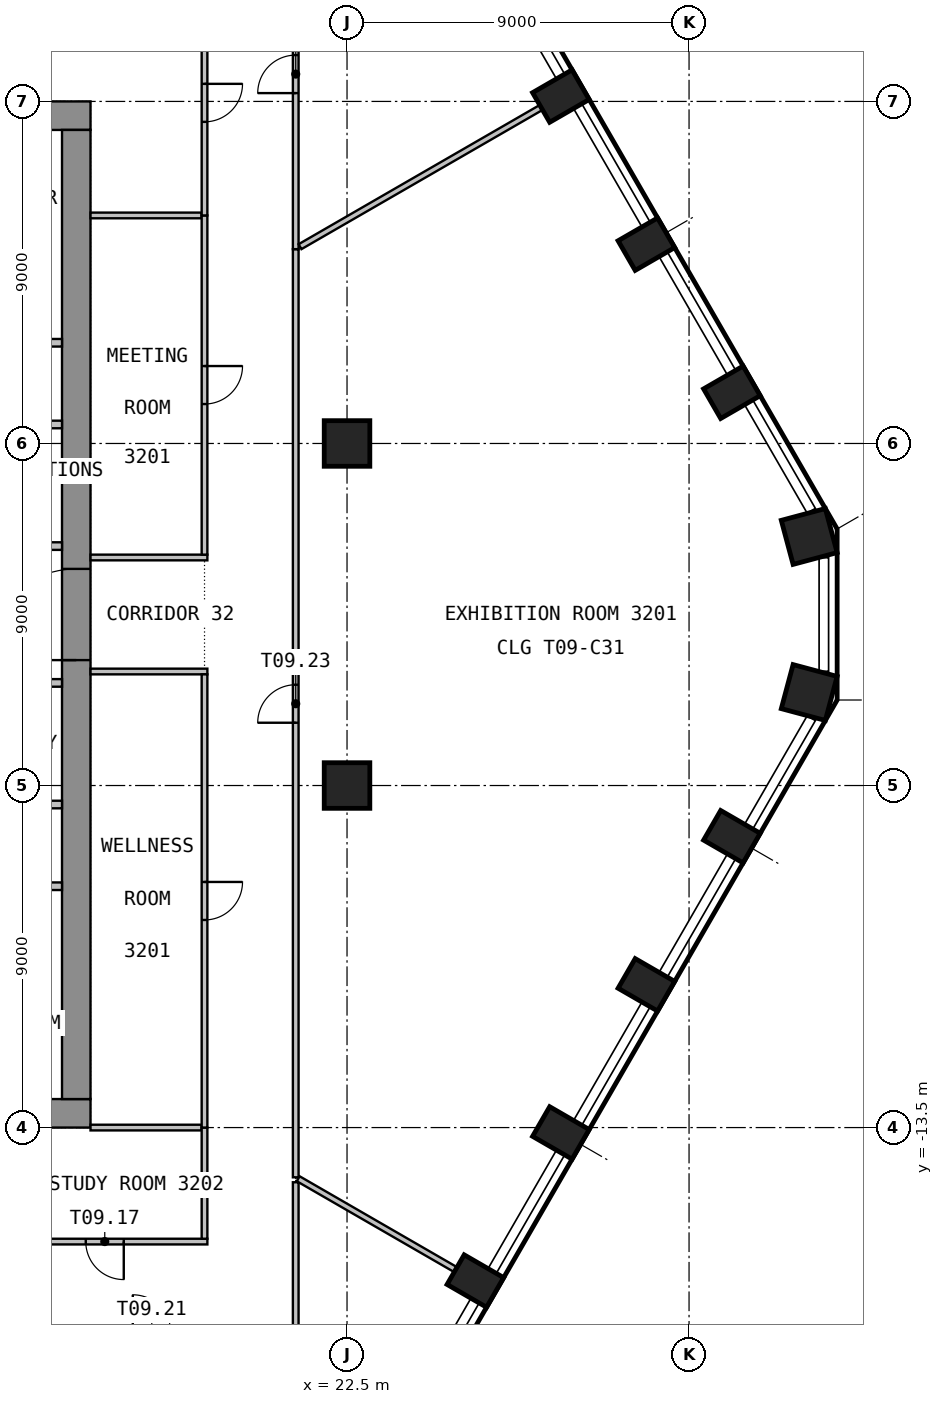
"""IFC4 building model, lengths in metres.
Left out: names, types, materials, properties, quantities, classifications, styles, units other than length and angle.
Written with IfcOpenShell. Run it as: python <this file> out.ifc"""

import sys

from ifc_helpers import new_model, si_unit, direction, frame, frame_2d, origin, origin_2d, place, context, subcontext, project, spatial, rectangle, circle, extrude, element, fill, save


model = new_model("IFC4")
c1 = context("Model", 3, precision=1e-05, world=origin(), true_north=direction((0.0, 1.0)))
c2 = subcontext(c1, "Body", "Model", "MODEL_VIEW")
j1 = project(units=[si_unit("LENGTHUNIT", "METRE"), si_unit("PLANEANGLEUNIT", "RADIAN")], contexts=[c1])
p1 = place(None, origin())
s1 = spatial("IfcSite", under=j1, at=p1, CompositionType="ELEMENT")
p2 = place(p1, origin())
s2 = spatial("IfcBuilding", under=s1, at=p2, CompositionType="ELEMENT")
p3 = place(p2, frame((0.0, 0.0, 132.6)))
s3 = spatial("IfcBuildingStorey", under=s2, at=p3, CompositionType="ELEMENT", Elevation=132.6)
for number, where, z_axis, x_axis in (
    (1, (25.877, -17.539, 0.0), (0.0, 0.0, 1.0), (0.5, 0.866, 0.0)),
    (2, (28.127, -13.641, 0.0), (0.0, 0.0, 1.0), (0.5, 0.866, 0.0)),
    (3, (30.377, -9.744, 0.0), (0.0, 0.0, 1.0), (0.5, 0.866, 0.0)),
    (4, (32.627, -5.847, 0.0), (0.0, 0.0, 1.0), (0.5, 0.866, 0.0)),
):
    element("IfcColumn", number, at=place(p3, frame(where, z_axis=z_axis, x_axis=x_axis)), inside=s3, PredefinedType="COLUMN", context=c2, shape_type="SweptSolid", body=[
        extrude(rectangle(XDim=0.9, YDim=1.2, at=origin_2d()), origin(), (0.0, 0.0, 1.0), 3.575),
    ])
for number, where, z_axis, x_axis in (
    (5, (34.662, -2.053, 0.0), (0.0, 0.0, 1.0), (0.259, 0.966, 0.0)),
    (6, (34.662, 2.053, 0.0), (0.0, 0.0, 1.0), (-0.259, 0.966, 0.0)),
):
    element("IfcColumn", number, at=place(p3, frame(where, z_axis=z_axis, x_axis=x_axis)), inside=s3, PredefinedType="COLUMN", context=c2, shape_type="SweptSolid", body=[
        extrude(rectangle(XDim=1.2, YDim=1.2, at=origin_2d()), origin(), (0.0, 0.0, 1.0), 3.575),
    ])
for number, where, z_axis, x_axis in (
    (7, (32.627, 5.847, 0.0), (0.0, 0.0, 1.0), (-0.5, 0.866, 0.0)),
    (8, (30.377, 9.744, 0.0), (0.0, 0.0, 1.0), (-0.5, 0.866, 0.0)),
    (9, (28.127, 13.641, 0.0), (0.0, 0.0, 1.0), (-0.5, 0.866, 0.0)),
):
    element("IfcColumn", number, at=place(p3, frame(where, z_axis=z_axis, x_axis=x_axis)), inside=s3, PredefinedType="COLUMN", context=c2, shape_type="SweptSolid", body=[
        extrude(rectangle(XDim=0.9, YDim=1.2, at=origin_2d()), origin(), (0.0, 0.0, 1.0), 3.575),
    ])
for number, where, z_axis, x_axis in (
    (10, (22.5, -4.5, 0.0), (0.0, 0.0, 1.0), (1.0, 0.0, 0.0)),
    (11, (22.5, 4.5, 0.0), (0.0, 0.0, 1.0), (1.0, 0.0, 0.0)),
):
    element("IfcColumn", number, at=place(p3, frame(where, z_axis=z_axis, x_axis=x_axis)), inside=s3, PredefinedType="COLUMN", context=c2, shape_type="SweptSolid", body=[
        extrude(circle(Radius=0.6, at=origin_2d()), origin(), (0.0, 0.0, 1.0), 3.575),
    ])
p4 = place(p3, frame((-15.75, 13.125, 0.0), z_axis=(0.0, 0.0, 1.0), x_axis=(1.0, 0.0, 0.0)))
e12 = element("IfcWall", 12, at=p4, inside=s3, PredefinedType="SHEAR", context=c2, shape_type="SweptSolid", body=[
    extrude(rectangle(XDim=31.5, YDim=0.75, at=frame_2d((15.75, 0.0))), origin(), (0.0, 0.0, 1.0), 3.575),
])
p5 = place(p4, frame((14.55, 0.0, 0.0)))
e13 = element("IfcOpeningElement", 13, at=p5, cuts=e12, PredefinedType="OPENING", context=c2, shape_type="SweptSolid", body=[
    extrude(rectangle(XDim=2.4, YDim=2.1, at=frame_2d((1.2, 1.05))), frame((0.0, 0.385, 0.0), z_axis=(0.0, -1.0, 0.0), x_axis=(1.0, 0.0, 0.0)), (0.0, 0.0, 1.0), 0.77),
])
p6 = place(p4, frame((3.3, 0.0, 0.0)))
e14 = element("IfcOpeningElement", 14, at=p6, cuts=e12, PredefinedType="OPENING", context=c2, shape_type="SweptSolid", body=[
    extrude(rectangle(XDim=1.2, YDim=2.1, at=frame_2d((0.6, 1.05))), frame((0.0, 0.385, 0.0), z_axis=(0.0, -1.0, 0.0), x_axis=(1.0, 0.0, 0.0)), (0.0, 0.0, 1.0), 0.77),
])
p7 = place(p4, frame((27.0, 0.0, 0.0)))
e15 = element("IfcOpeningElement", 15, at=p7, cuts=e12, PredefinedType="OPENING", context=c2, shape_type="SweptSolid", body=[
    extrude(rectangle(XDim=1.2, YDim=2.1, at=frame_2d((0.6, 1.05))), frame((0.0, 0.385, 0.0), z_axis=(0.0, -1.0, 0.0), x_axis=(1.0, 0.0, 0.0)), (0.0, 0.0, 1.0), 0.77),
])
p8 = place(p3, frame((-15.75, -13.125, 0.0), z_axis=(0.0, 0.0, 1.0), x_axis=(1.0, 0.0, 0.0)))
e16 = element("IfcWall", 16, at=p8, inside=s3, PredefinedType="SHEAR", context=c2, shape_type="SweptSolid", body=[
    extrude(rectangle(XDim=31.5, YDim=0.75, at=frame_2d((15.75, 0.0))), origin(), (0.0, 0.0, 1.0), 3.575),
])
p9 = place(p8, frame((14.55, 0.0, 0.0)))
e17 = element("IfcOpeningElement", 17, at=p9, cuts=e16, PredefinedType="OPENING", context=c2, shape_type="SweptSolid", body=[
    extrude(rectangle(XDim=2.4, YDim=2.1, at=frame_2d((1.2, 1.05))), frame((0.0, 0.385, 0.0), z_axis=(0.0, -1.0, 0.0), x_axis=(1.0, 0.0, 0.0)), (0.0, 0.0, 1.0), 0.77),
])
p10 = place(p8, frame((3.3, 0.0, 0.0)))
e18 = element("IfcOpeningElement", 18, at=p10, cuts=e16, PredefinedType="OPENING", context=c2, shape_type="SweptSolid", body=[
    extrude(rectangle(XDim=1.2, YDim=2.1, at=frame_2d((0.6, 1.05))), frame((0.0, 0.385, 0.0), z_axis=(0.0, -1.0, 0.0), x_axis=(1.0, 0.0, 0.0)), (0.0, 0.0, 1.0), 0.77),
])
p11 = place(p8, frame((27.0, 0.0, 0.0)))
e19 = element("IfcOpeningElement", 19, at=p11, cuts=e16, PredefinedType="OPENING", context=c2, shape_type="SweptSolid", body=[
    extrude(rectangle(XDim=1.2, YDim=2.1, at=frame_2d((0.6, 1.05))), frame((0.0, 0.385, 0.0), z_axis=(0.0, -1.0, 0.0), x_axis=(1.0, 0.0, 0.0)), (0.0, 0.0, 1.0), 0.77),
])
p12 = place(p3, frame((15.375, -12.75, 0.0), z_axis=(0.0, 0.0, 1.0), x_axis=(0.0, 1.0, 0.0)))
e20 = element("IfcWall", 20, at=p12, inside=s3, PredefinedType="SHEAR", context=c2, shape_type="SweptSolid", body=[
    extrude(rectangle(XDim=25.5, YDim=0.75, at=frame_2d((12.75, 0.0))), origin(), (0.0, 0.0, 1.0), 3.575),
])
p13 = place(p12, frame((11.55, 0.0, 0.0)))
e21 = element("IfcOpeningElement", 21, at=p13, cuts=e20, PredefinedType="OPENING", context=c2, shape_type="SweptSolid", body=[
    extrude(rectangle(XDim=2.4, YDim=2.1, at=frame_2d((1.2, 1.05))), frame((0.0, 0.385, 0.0), z_axis=(0.0, -1.0, 0.0), x_axis=(1.0, 0.0, 0.0)), (0.0, 0.0, 1.0), 0.77),
])
p14 = place(p3, frame((12.9, 7.15, 0.0), z_axis=(0.0, 0.0, 1.0), x_axis=(1.0, 0.0, 0.0)))
e22 = element("IfcWall", 22, at=p14, inside=s3, PredefinedType="PARTITIONING", context=c2, shape_type="SweptSolid", body=[
    extrude(rectangle(XDim=2.1, YDim=0.2, at=frame_2d((1.05, 0.0))), origin(), (0.0, 0.0, 1.0), 3.575),
])
p15 = place(p14, frame((0.6, 0.0, 0.0)))
e23 = element("IfcOpeningElement", 23, at=p15, cuts=e22, PredefinedType="OPENING", context=c2, shape_type="SweptSolid", body=[
    extrude(rectangle(XDim=0.9, YDim=2.1, at=frame_2d((0.45, 1.05))), frame((0.0, 0.11, 0.0), z_axis=(0.0, -1.0, 0.0), x_axis=(1.0, 0.0, 0.0)), (0.0, 0.0, 1.0), 0.22),
])
p16 = place(p3, frame((12.9, 5.0, 0.0), z_axis=(0.0, 0.0, 1.0), x_axis=(1.0, 0.0, 0.0)))
e24 = element("IfcWall", 24, at=p16, inside=s3, PredefinedType="PARTITIONING", context=c2, shape_type="SweptSolid", body=[
    extrude(rectangle(XDim=2.1, YDim=0.2, at=frame_2d((1.05, 0.0))), origin(), (0.0, 0.0, 1.0), 3.575),
])
p17 = place(p16, frame((0.6, 0.0, 0.0)))
e25 = element("IfcOpeningElement", 25, at=p17, cuts=e24, PredefinedType="OPENING", context=c2, shape_type="SweptSolid", body=[
    extrude(rectangle(XDim=0.9, YDim=2.1, at=frame_2d((0.45, 1.05))), frame((0.0, 0.11, 0.0), z_axis=(0.0, -1.0, 0.0), x_axis=(1.0, 0.0, 0.0)), (0.0, 0.0, 1.0), 0.22),
])
p18 = place(p3, frame((12.9, 1.8, 0.0), z_axis=(0.0, 0.0, 1.0), x_axis=(1.0, 0.0, 0.0)))
e26 = element("IfcWall", 26, at=p18, inside=s3, PredefinedType="PARTITIONING", context=c2, shape_type="SweptSolid", body=[
    extrude(rectangle(XDim=2.1, YDim=0.2, at=frame_2d((1.05, 0.0))), origin(), (0.0, 0.0, 1.0), 3.575),
])
p19 = place(p3, frame((12.9, -7.15, 0.0), z_axis=(0.0, 0.0, 1.0), x_axis=(1.0, 0.0, 0.0)))
e27 = element("IfcWall", 27, at=p19, inside=s3, PredefinedType="PARTITIONING", context=c2, shape_type="SweptSolid", body=[
    extrude(rectangle(XDim=2.1, YDim=0.2, at=frame_2d((1.05, 0.0))), origin(), (0.0, 0.0, 1.0), 3.575),
])
p20 = place(p19, frame((0.6, 0.0, 0.0)))
e28 = element("IfcOpeningElement", 28, at=p20, cuts=e27, PredefinedType="OPENING", context=c2, shape_type="SweptSolid", body=[
    extrude(rectangle(XDim=0.9, YDim=2.1, at=frame_2d((0.45, 1.05))), frame((0.0, 0.11, 0.0), z_axis=(0.0, -1.0, 0.0), x_axis=(1.0, 0.0, 0.0)), (0.0, 0.0, 1.0), 0.22),
])
p21 = place(p3, frame((12.9, -5.0, 0.0), z_axis=(0.0, 0.0, 1.0), x_axis=(1.0, 0.0, 0.0)))
e29 = element("IfcWall", 29, at=p21, inside=s3, PredefinedType="PARTITIONING", context=c2, shape_type="SweptSolid", body=[
    extrude(rectangle(XDim=2.1, YDim=0.2, at=frame_2d((1.05, 0.0))), origin(), (0.0, 0.0, 1.0), 3.575),
])
p22 = place(p21, frame((0.6, 0.0, 0.0)))
e30 = element("IfcOpeningElement", 30, at=p22, cuts=e29, PredefinedType="OPENING", context=c2, shape_type="SweptSolid", body=[
    extrude(rectangle(XDim=0.9, YDim=2.1, at=frame_2d((0.45, 1.05))), frame((0.0, 0.11, 0.0), z_axis=(0.0, -1.0, 0.0), x_axis=(1.0, 0.0, 0.0)), (0.0, 0.0, 1.0), 0.22),
])
p23 = place(p3, frame((12.9, -1.8, 0.0), z_axis=(0.0, 0.0, 1.0), x_axis=(1.0, 0.0, 0.0)))
e31 = element("IfcWall", 31, at=p23, inside=s3, PredefinedType="PARTITIONING", context=c2, shape_type="SweptSolid", body=[
    extrude(rectangle(XDim=2.1, YDim=0.2, at=frame_2d((1.05, 0.0))), origin(), (0.0, 0.0, 1.0), 3.575),
])
p24 = place(p3, frame((18.825, -16.5, 0.0), z_axis=(0.0, 0.0, 1.0), x_axis=(-1.0, 0.0, 0.0)))
e32 = element("IfcWall", 32, at=p24, inside=s3, PredefinedType="PARTITIONING", context=c2, shape_type="SweptSolid", body=[
    extrude(rectangle(XDim=5.4, YDim=0.15, at=frame_2d((2.7, 0.0))), origin(), (0.0, 0.0, 1.0), 3.575),
])
p25 = place(p24, frame((2.2, 0.0, 0.0)))
e33 = element("IfcOpeningElement", 33, at=p25, cuts=e32, PredefinedType="OPENING", context=c2, shape_type="SweptSolid", body=[
    extrude(rectangle(XDim=1.0, YDim=2.1, at=frame_2d((0.5, 1.05))), frame((0.0, 0.085, 0.0), z_axis=(0.0, -1.0, 0.0), x_axis=(1.0, 0.0, 0.0)), (0.0, 0.0, 1.0), 0.17),
])
p26 = place(p3, frame((15.75, -13.5, 0.0), z_axis=(0.0, 0.0, 1.0), x_axis=(1.0, 0.0, 0.0)))
e34 = element("IfcWall", 34, at=p26, inside=s3, PredefinedType="PARTITIONING", context=c2, shape_type="SweptSolid", body=[
    extrude(rectangle(XDim=2.925, YDim=0.15, at=frame_2d((1.462, 0.0))), origin(), (0.0, 0.0, 1.0), 3.575),
])
for number, where, z_axis, x_axis in (
    (35, (15.75, -1.5, 0.0), (0.0, 0.0, 1.0), (1.0, 0.0, 0.0)),
    (36, (18.825, 1.5, 0.0), (0.0, 0.0, 1.0), (-1.0, 0.0, 0.0)),
):
    element("IfcWall", number, at=place(p3, frame(where, z_axis=z_axis, x_axis=x_axis)), inside=s3, PredefinedType="PARTITIONING", context=c2, shape_type="SweptSolid", body=[
        extrude(rectangle(XDim=3.075, YDim=0.15, at=frame_2d((1.538, 0.0))), origin(), (0.0, 0.0, 1.0), 3.575),
    ])
for number, where, z_axis, x_axis in (
    (37, (18.675, 10.5, 0.0), (0.0, 0.0, 1.0), (-1.0, 0.0, 0.0)),
    (38, (18.75, -13.5, 0.0), (0.0, 0.0, 1.0), (0.0, -1.0, 0.0)),
):
    element("IfcWall", number, at=place(p3, frame(where, z_axis=z_axis, x_axis=x_axis)), inside=s3, PredefinedType="PARTITIONING", context=c2, shape_type="SweptSolid", body=[
        extrude(rectangle(XDim=2.925, YDim=0.15, at=frame_2d((1.462, 0.0))), origin(), (0.0, 0.0, 1.0), 3.575),
    ])
p27 = place(p3, frame((18.75, -1.575, 0.0), z_axis=(0.0, 0.0, 1.0), x_axis=(0.0, -1.0, 0.0)))
e39 = element("IfcWall", 39, at=p27, inside=s3, PredefinedType="PARTITIONING", context=c2, shape_type="SweptSolid", body=[
    extrude(rectangle(XDim=11.925, YDim=0.15, at=frame_2d((5.962, 0.0))), origin(), (0.0, 0.0, 1.0), 3.575),
])
p28 = place(p27, frame((5.462, 0.0, 0.0)))
e40 = element("IfcOpeningElement", 40, at=p28, cuts=e39, PredefinedType="OPENING", context=c2, shape_type="SweptSolid", body=[
    extrude(rectangle(XDim=1.0, YDim=2.1, at=frame_2d((0.5, 1.05))), frame((0.0, 0.085, 0.0), z_axis=(0.0, -1.0, 0.0), x_axis=(1.0, 0.0, 0.0)), (0.0, 0.0, 1.0), 0.17),
])
p29 = place(p3, frame((18.75, 10.5, 0.0), z_axis=(0.0, 0.0, 1.0), x_axis=(0.0, -1.0, 0.0)))
e41 = element("IfcWall", 41, at=p29, inside=s3, PredefinedType="PARTITIONING", context=c2, shape_type="SweptSolid", body=[
    extrude(rectangle(XDim=8.925, YDim=0.15, at=frame_2d((4.462, 0.0))), origin(), (0.0, 0.0, 1.0), 3.575),
])
p30 = place(p29, frame((3.962, 0.0, 0.0)))
e42 = element("IfcOpeningElement", 42, at=p30, cuts=e41, PredefinedType="OPENING", context=c2, shape_type="SweptSolid", body=[
    extrude(rectangle(XDim=1.0, YDim=2.1, at=frame_2d((0.5, 1.05))), frame((0.0, 0.085, 0.0), z_axis=(0.0, -1.0, 0.0), x_axis=(1.0, 0.0, 0.0)), (0.0, 0.0, 1.0), 0.17),
])
p31 = place(p3, frame((18.75, 16.425, 0.0), z_axis=(0.0, 0.0, 1.0), x_axis=(0.0, -1.0, 0.0)))
e43 = element("IfcWall", 43, at=p31, inside=s3, PredefinedType="PARTITIONING", context=c2, shape_type="SweptSolid", body=[
    extrude(rectangle(XDim=5.925, YDim=0.15, at=frame_2d((2.962, 0.0))), origin(), (0.0, 0.0, 1.0), 3.575),
])
p32 = place(p31, frame((2.462, 0.0, 0.0)))
e44 = element("IfcOpeningElement", 44, at=p32, cuts=e43, PredefinedType="OPENING", context=c2, shape_type="SweptSolid", body=[
    extrude(rectangle(XDim=1.0, YDim=2.1, at=frame_2d((0.5, 1.05))), frame((0.0, 0.085, 0.0), z_axis=(0.0, -1.0, 0.0), x_axis=(1.0, 0.0, 0.0)), (0.0, 0.0, 1.0), 0.17),
])
p33 = place(p3, frame((21.15, -18.825, 0.0), z_axis=(0.0, 0.0, 1.0), x_axis=(0.0, 1.0, 0.0)))
e45 = element("IfcWall", 45, at=p33, inside=s3, PredefinedType="PARTITIONING", context=c2, shape_type="SweptSolid", body=[
    extrude(rectangle(XDim=3.886, YDim=0.15, at=frame_2d((1.943, 0.0))), origin(), (0.0, 0.0, 1.0), 3.575),
])
p34 = place(p3, frame((21.15, -14.809, 0.0), z_axis=(0.0, 0.0, 1.0), x_axis=(0.0, 1.0, 0.0)))
e46 = element("IfcWall", 46, at=p34, inside=s3, PredefinedType="PARTITIONING", context=c2, shape_type="SweptSolid", body=[
    extrude(rectangle(XDim=24.422, YDim=0.15, at=frame_2d((12.211, 0.0))), origin(), (0.0, 0.0, 1.0), 3.575),
])
p35 = place(p34, frame((11.961, 0.0, 0.0)))
e47 = element("IfcOpeningElement", 47, at=p35, cuts=e46, PredefinedType="OPENING", context=c2, shape_type="SweptSolid", body=[
    extrude(rectangle(XDim=1.0, YDim=2.1, at=frame_2d((0.5, 1.05))), frame((0.0, 0.085, 0.0), z_axis=(0.0, -1.0, 0.0), x_axis=(1.0, 0.0, 0.0)), (0.0, 0.0, 1.0), 0.17),
])
p36 = place(p3, frame((21.215, -14.846, 0.0), z_axis=(0.0, 0.0, 1.0), x_axis=(0.866039654489, -0.499975316243, 0.0)))
e48 = element("IfcWall", 48, at=p36, inside=s3, PredefinedType="PARTITIONING", context=c2, shape_type="SweptSolid", body=[
    extrude(rectangle(XDim=4.764, YDim=0.15, at=frame_2d((2.382, 0.0))), origin(), (0.0, 0.0, 1.0), 3.575),
])
p37 = place(p3, frame((21.15, 9.613, 0.0), z_axis=(0.0, 0.0, 1.0), x_axis=(0.0, 1.0, 0.0)))
e49 = element("IfcWall", 49, at=p37, inside=s3, PredefinedType="PARTITIONING", context=c2, shape_type="SweptSolid", body=[
    extrude(rectangle(XDim=9.212, YDim=0.15, at=frame_2d((4.606, 0.0))), origin(), (0.0, 0.0, 1.0), 3.575),
])
p38 = place(p37, frame((4.106, 0.0, 0.0)))
e50 = element("IfcOpeningElement", 50, at=p38, cuts=e49, PredefinedType="OPENING", context=c2, shape_type="SweptSolid", body=[
    extrude(rectangle(XDim=1.0, YDim=2.1, at=frame_2d((0.5, 1.05))), frame((0.0, 0.085, 0.0), z_axis=(0.0, -1.0, 0.0), x_axis=(1.0, 0.0, 0.0)), (0.0, 0.0, 1.0), 0.17),
])
p39 = place(p3, frame((27.591, 13.331, 0.0), z_axis=(0.0, 0.0, 1.0), x_axis=(-0.866030346483, -0.499991438897, 0.0)))
e51 = element("IfcWall", 51, at=p39, inside=s3, PredefinedType="PARTITIONING", context=c2, shape_type="SweptSolid", body=[
    extrude(rectangle(XDim=7.307, YDim=0.15, at=frame_2d((3.653, 0.0))), origin(), (0.0, 0.0, 1.0), 3.575),
])
p40 = place(p13, origin())
e52 = element("IfcDoor", 52, at=p40, inside=s3, OperationType="DOUBLE_DOOR_DOUBLE_SWING", PredefinedType="DOOR", context=c2, shape_type="SweptSolid", body=[
    extrude(rectangle(XDim=2.4, YDim=2.1, at=frame_2d((1.2, 1.05))), frame((0.0, 0.025, 0.0), z_axis=(0.0, -1.0, 0.0), x_axis=(1.0, 0.0, 0.0)), (0.0, 0.0, 1.0), 0.05),
])
fill(e21, e52)
p41 = place(p25, origin())
e53 = element("IfcDoor", 53, at=p41, inside=s3, OperationType="SINGLE_SWING_RIGHT", PredefinedType="DOOR", context=c2, shape_type="SweptSolid", body=[
    extrude(rectangle(XDim=1.0, YDim=2.1, at=frame_2d((0.5, 1.05))), frame((0.0, 0.025, 0.0), z_axis=(0.0, -1.0, 0.0), x_axis=(1.0, 0.0, 0.0)), (0.0, 0.0, 1.0), 0.05),
])
fill(e33, e53)
p42 = place(p32, origin())
e54 = element("IfcDoor", 54, at=p42, inside=s3, OperationType="SINGLE_SWING_LEFT", PredefinedType="DOOR", context=c2, shape_type="SweptSolid", body=[
    extrude(rectangle(XDim=1.0, YDim=2.1, at=frame_2d((0.5, 1.05))), frame((0.0, 0.025, 0.0), z_axis=(0.0, -1.0, 0.0), x_axis=(1.0, 0.0, 0.0)), (0.0, 0.0, 1.0), 0.05),
])
fill(e44, e54)
p43 = place(p28, origin())
e55 = element("IfcDoor", 55, at=p43, inside=s3, OperationType="SINGLE_SWING_RIGHT", PredefinedType="DOOR", context=c2, shape_type="SweptSolid", body=[
    extrude(rectangle(XDim=1.0, YDim=2.1, at=frame_2d((0.5, 1.05))), frame((0.0, 0.025, 0.0), z_axis=(0.0, -1.0, 0.0), x_axis=(1.0, 0.0, 0.0)), (0.0, 0.0, 1.0), 0.05),
])
fill(e40, e55)
p44 = place(p30, origin())
e56 = element("IfcDoor", 56, at=p44, inside=s3, OperationType="SINGLE_SWING_RIGHT", PredefinedType="DOOR", context=c2, shape_type="SweptSolid", body=[
    extrude(rectangle(XDim=1.0, YDim=2.1, at=frame_2d((0.5, 1.05))), frame((0.0, 0.025, 0.0), z_axis=(0.0, -1.0, 0.0), x_axis=(1.0, 0.0, 0.0)), (0.0, 0.0, 1.0), 0.05),
])
fill(e42, e56)
p45 = place(p38, origin())
e57 = element("IfcDoor", 57, at=p45, inside=s3, OperationType="SINGLE_SWING_RIGHT", PredefinedType="DOOR", context=c2, shape_type="SweptSolid", body=[
    extrude(rectangle(XDim=1.0, YDim=2.1, at=frame_2d((0.5, 1.05))), frame((0.0, 0.025, 0.0), z_axis=(0.0, -1.0, 0.0), x_axis=(1.0, 0.0, 0.0)), (0.0, 0.0, 1.0), 0.05),
])
fill(e50, e57)
p46 = place(p35, origin())
e58 = element("IfcDoor", 58, at=p46, inside=s3, OperationType="SINGLE_SWING_LEFT", PredefinedType="DOOR", context=c2, shape_type="SweptSolid", body=[
    extrude(rectangle(XDim=1.0, YDim=2.1, at=frame_2d((0.5, 1.05))), frame((0.0, 0.025, 0.0), z_axis=(0.0, -1.0, 0.0), x_axis=(1.0, 0.0, 0.0)), (0.0, 0.0, 1.0), 0.05),
])
fill(e47, e58)
save(model, sys.argv[1])
